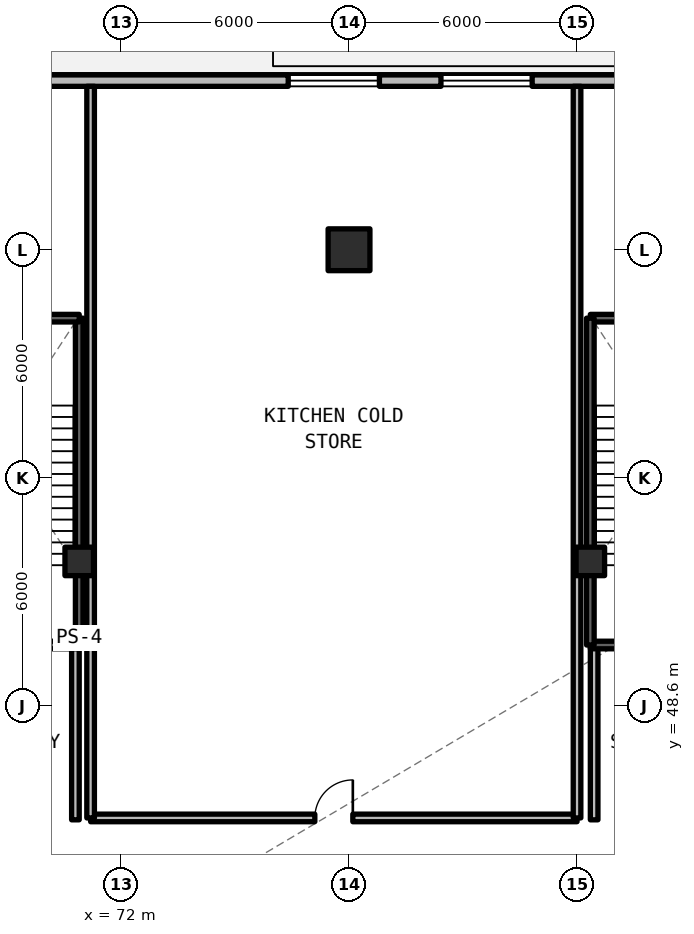
"""IFC4 building model, lengths in metres.
Left out: names, types, materials, properties, quantities, classifications, styles, units other than length and angle.
Written with IfcOpenShell. Run it as: python <this file> out.ifc"""

import sys

from ifc_helpers import new_model, si_unit, direction, frame, frame_2d, origin, origin_2d, place, context, subcontext, project, spatial, rectangle, circle, extrude, element, fill, save


model = new_model("IFC4")
c1 = context("Model", 3, precision=1e-05, world=origin(), true_north=direction((0.0, 1.0)))
c2 = subcontext(c1, "Body", "Model", "MODEL_VIEW")
j1 = project(units=[si_unit("LENGTHUNIT", "METRE"), si_unit("PLANEANGLEUNIT", "RADIAN")], contexts=[c1])
p1 = place(None, origin())
s1 = spatial("IfcSite", under=j1, at=p1, CompositionType="ELEMENT")
p2 = place(p1, origin())
s2 = spatial("IfcBuilding", under=s1, at=p2, CompositionType="ELEMENT")
p3 = place(p2, frame((0.0, 0.0, 9.9)))
s3 = spatial("IfcBuildingStorey", under=s2, at=p3, CompositionType="ELEMENT", Elevation=9.9)
p4 = place(p3, frame((78.0, 60.6, 0.0), z_axis=(0.0, 0.0, 1.0), x_axis=(1.0, 0.0, 0.0)))
e1 = element("IfcColumn", 1, at=p4, inside=s3, PredefinedType="COLUMN", context=c2, shape_type="SweptSolid", body=[
    extrude(circle(Radius=0.55, at=origin_2d()), origin(), (0.0, 0.0, 1.0), 4.95),
])
for number, where, z_axis, x_axis in (
    (2, (70.9, 52.4, 0.0), (0.0, 0.0, 1.0), (1.0, 0.0, 0.0)),
    (3, (84.35, 52.4, 0.0), (0.0, 0.0, 1.0), (1.0, 0.0, 0.0)),
):
    element("IfcColumn", number, at=place(p3, frame(where, z_axis=z_axis, x_axis=x_axis)), inside=s3, PredefinedType="COLUMN", context=c2, shape_type="SweptSolid", body=[
        extrude(rectangle(XDim=0.75, YDim=0.75, at=origin_2d()), origin(), (0.0, 0.0, 1.0), 4.95),
    ])
p5 = place(p3, frame((108.538, 65.05, 0.0), z_axis=(0.0, 0.0, 1.0), x_axis=(-1.0, 0.0, 0.0)))
e4 = element("IfcWall", 4, at=p5, inside=s3, PredefinedType="SOLIDWALL", context=c2, shape_type="SweptSolid", body=[
    extrude(rectangle(XDim=44.338, YDim=0.3, at=frame_2d((22.169, 0.0))), origin(), (0.0, 0.0, 1.0), 4.67),
])
p6 = place(p5, frame((7.75, 0.0, 0.0)))
e5 = element("IfcOpeningElement", 5, at=p6, cuts=e4, PredefinedType="OPENING", context=c2, shape_type="SweptSolid", body=[
    extrude(rectangle(XDim=1.5, YDim=2.2, at=frame_2d((0.75, 1.1))), frame((0.0, 0.16, 0.0), z_axis=(0.0, -1.0, 0.0), x_axis=(1.0, 0.0, 0.0)), (0.0, 0.0, 1.0), 0.32),
])
p7 = place(p5, frame((42.913, 0.0, 0.78)))
e6 = element("IfcOpeningElement", 6, at=p7, cuts=e4, PredefinedType="OPENING", context=c2, shape_type="SweptSolid", body=[
    extrude(rectangle(XDim=0.85, YDim=1.65, at=frame_2d((0.425, 0.825))), frame((0.0, 0.16, 0.0), z_axis=(0.0, -1.0, 0.0), x_axis=(1.0, 0.0, 0.0)), (0.0, 0.0, 1.0), 0.32),
])
p8 = place(p5, frame((29.738, 0.0, 0.78)))
e7 = element("IfcOpeningElement", 7, at=p8, cuts=e4, PredefinedType="OPENING", context=c2, shape_type="SweptSolid", body=[
    extrude(rectangle(XDim=2.4, YDim=1.66, at=frame_2d((1.2, 0.83))), frame((0.0, 0.16, 0.0), z_axis=(0.0, -1.0, 0.0), x_axis=(1.0, 0.0, 0.0)), (0.0, 0.0, 1.0), 0.32),
])
p9 = place(p5, frame((38.638, 0.0, 0.78)))
e8 = element("IfcOpeningElement", 8, at=p9, cuts=e4, PredefinedType="OPENING", context=c2, shape_type="SweptSolid", body=[
    extrude(rectangle(XDim=2.4, YDim=1.66, at=frame_2d((1.2, 0.83))), frame((0.0, 0.16, 0.0), z_axis=(0.0, -1.0, 0.0), x_axis=(1.0, 0.0, 0.0)), (0.0, 0.0, 1.0), 0.32),
])
p10 = place(p5, frame((16.219, 0.0, 0.78)))
e9 = element("IfcOpeningElement", 9, at=p10, cuts=e4, PredefinedType="OPENING", context=c2, shape_type="SweptSolid", body=[
    extrude(rectangle(XDim=2.4, YDim=1.66, at=frame_2d((1.2, 0.83))), frame((0.0, 0.16, 0.0), z_axis=(0.0, -1.0, 0.0), x_axis=(1.0, 0.0, 0.0)), (0.0, 0.0, 1.0), 0.32),
])
p11 = place(p5, frame((25.719, 0.0, 0.78)))
e10 = element("IfcOpeningElement", 10, at=p11, cuts=e4, PredefinedType="OPENING", context=c2, shape_type="SweptSolid", body=[
    extrude(rectangle(XDim=2.4, YDim=1.66, at=frame_2d((1.2, 0.83))), frame((0.0, 0.16, 0.0), z_axis=(0.0, -1.0, 0.0), x_axis=(1.0, 0.0, 0.0)), (0.0, 0.0, 1.0), 0.32),
])
for number, where, z_axis, x_axis in (
    (11, (70.8, 45.6, 0.0), (0.0, 0.0, 1.0), (0.0, 1.0, 0.0)),
    (12, (84.45, 45.6, 0.0), (0.0, 0.0, 1.0), (0.0, 1.0, 0.0)),
):
    element("IfcWall", number, at=place(p3, frame(where, z_axis=z_axis, x_axis=x_axis)), inside=s3, PredefinedType="SOLIDWALL", context=c2, shape_type="SweptSolid", body=[
        extrude(rectangle(XDim=4.6, YDim=0.2, at=frame_2d((2.3, 0.0))), origin(), (0.0, 0.0, 1.0), 3.89),
    ])
p12 = place(p3, frame((71.2, 45.65, 0.0), z_axis=(0.0, 0.0, 1.0), x_axis=(1.0, 0.0, 0.0)))
e13 = element("IfcWall", 13, at=p12, inside=s3, PredefinedType="SOLIDWALL", context=c2, shape_type="SweptSolid", body=[
    extrude(rectangle(XDim=12.8, YDim=0.2, at=frame_2d((6.4, 0.0))), origin(), (0.0, 0.0, 1.0), 3.89),
])
p13 = place(p12, frame((5.9, 0.0, 0.0)))
e14 = element("IfcOpeningElement", 14, at=p13, cuts=e13, PredefinedType="OPENING", context=c2, shape_type="SweptSolid", body=[
    extrude(rectangle(XDim=1.0, YDim=2.15, at=frame_2d((0.5, 1.075))), frame((0.0, 0.11, 0.0), z_axis=(0.0, -1.0, 0.0), x_axis=(1.0, 0.0, 0.0)), (0.0, 0.0, 1.0), 0.22),
])
for number, where, z_axis, x_axis in (
    (15, (71.2, 45.65, 0.0), (0.0, 0.0, 1.0), (0.0, 1.0, 0.0)),
    (16, (84.0, 45.65, 0.0), (0.0, 0.0, 1.0), (0.0, 1.0, 0.0)),
):
    element("IfcWall", number, at=place(p3, frame(where, z_axis=z_axis, x_axis=x_axis)), inside=s3, PredefinedType="SOLIDWALL", context=c2, shape_type="SweptSolid", body=[
        extrude(rectangle(XDim=19.25, YDim=0.2, at=frame_2d((9.625, 0.0))), origin(), (0.0, 0.0, 1.0), 3.89),
    ])
p14 = place(p3, frame((66.5, 50.2, 0.0), z_axis=(0.0, 0.0, 1.0), x_axis=(1.0, 0.0, 0.0)))
e17 = element("IfcWall", 17, at=p14, inside=s3, PredefinedType="SOLIDWALL", context=c2, shape_type="SweptSolid", body=[
    extrude(rectangle(XDim=4.4, YDim=0.2, at=frame_2d((2.2, 0.0))), origin(), (0.0, 0.0, 1.0), 4.95),
])
p15 = place(p14, frame((1.625, 0.0, 0.0)))
e18 = element("IfcOpeningElement", 18, at=p15, cuts=e17, PredefinedType="OPENING", context=c2, shape_type="SweptSolid", body=[
    extrude(rectangle(XDim=1.15, YDim=2.15, at=frame_2d((0.575, 1.075))), frame((0.0, 0.11, 0.0), z_axis=(0.0, -1.0, 0.0), x_axis=(1.0, 0.0, 0.0)), (0.0, 0.0, 1.0), 0.22),
])
p16 = place(p3, frame((70.9, 50.2, 0.0), z_axis=(0.0, 0.0, 1.0), x_axis=(0.0, 1.0, 0.0)))
e19 = element("IfcWall", 19, at=p16, inside=s3, PredefinedType="SOLIDWALL", context=c2, shape_type="SweptSolid", body=[
    extrude(rectangle(XDim=8.6, YDim=0.2, at=frame_2d((4.3, 0.0))), origin(), (0.0, 0.0, 1.0), 4.95),
])
p17 = place(p3, frame((70.9, 58.8, 0.0), z_axis=(0.0, 0.0, 1.0), x_axis=(-1.0, 0.0, 0.0)))
e20 = element("IfcWall", 20, at=p17, inside=s3, PredefinedType="SOLIDWALL", context=c2, shape_type="SweptSolid", body=[
    extrude(rectangle(XDim=4.4, YDim=0.2, at=frame_2d((2.2, 0.0))), origin(), (0.0, 0.0, 1.0), 4.95),
])
p18 = place(p3, frame((84.35, 50.2, 0.0), z_axis=(0.0, 0.0, 1.0), x_axis=(1.0, 0.0, 0.0)))
e21 = element("IfcWall", 21, at=p18, inside=s3, PredefinedType="SOLIDWALL", context=c2, shape_type="SweptSolid", body=[
    extrude(rectangle(XDim=4.4, YDim=0.2, at=frame_2d((2.2, 0.0))), origin(), (0.0, 0.0, 1.0), 4.95),
])
p19 = place(p18, frame((1.625, 0.0, 0.0)))
e22 = element("IfcOpeningElement", 22, at=p19, cuts=e21, PredefinedType="OPENING", context=c2, shape_type="SweptSolid", body=[
    extrude(rectangle(XDim=1.15, YDim=2.15, at=frame_2d((0.575, 1.075))), frame((0.0, 0.11, 0.0), z_axis=(0.0, -1.0, 0.0), x_axis=(1.0, 0.0, 0.0)), (0.0, 0.0, 1.0), 0.22),
])
p20 = place(p3, frame((88.75, 58.8, 0.0), z_axis=(0.0, 0.0, 1.0), x_axis=(-1.0, 0.0, 0.0)))
e23 = element("IfcWall", 23, at=p20, inside=s3, PredefinedType="SOLIDWALL", context=c2, shape_type="SweptSolid", body=[
    extrude(rectangle(XDim=4.4, YDim=0.2, at=frame_2d((2.2, 0.0))), origin(), (0.0, 0.0, 1.0), 4.95),
])
p21 = place(p3, frame((84.35, 58.8, 0.0), z_axis=(0.0, 0.0, 1.0), x_axis=(0.0, -1.0, 0.0)))
e24 = element("IfcWall", 24, at=p21, inside=s3, PredefinedType="SOLIDWALL", context=c2, shape_type="SweptSolid", body=[
    extrude(rectangle(XDim=8.6, YDim=0.2, at=frame_2d((4.3, 0.0))), origin(), (0.0, 0.0, 1.0), 4.95),
])
p22 = place(p8, origin())
e25 = element("IfcWindow", 25, at=p22, inside=s3, PartitioningType="SINGLE_PANEL", PredefinedType="WINDOW", context=c2, shape_type="SweptSolid", body=[
    extrude(rectangle(XDim=2.4, YDim=1.66, at=frame_2d((1.2, 0.83))), frame((0.0, 0.03, 0.0), z_axis=(0.0, -1.0, 0.0), x_axis=(1.0, 0.0, 0.0)), (0.0, 0.0, 1.0), 0.06),
])
fill(e7, e25)
p23 = place(p11, origin())
e26 = element("IfcWindow", 26, at=p23, inside=s3, PartitioningType="SINGLE_PANEL", PredefinedType="WINDOW", context=c2, shape_type="SweptSolid", body=[
    extrude(rectangle(XDim=2.4, YDim=1.66, at=frame_2d((1.2, 0.83))), frame((0.0, 0.03, 0.0), z_axis=(0.0, -1.0, 0.0), x_axis=(1.0, 0.0, 0.0)), (0.0, 0.0, 1.0), 0.06),
])
fill(e10, e26)
p24 = place(p13, origin())
e27 = element("IfcDoor", 27, at=p24, inside=s3, OperationType="SINGLE_SWING_RIGHT", PredefinedType="DOOR", context=c2, shape_type="SweptSolid", body=[
    extrude(rectangle(XDim=1.0, YDim=2.15, at=frame_2d((0.5, 1.075))), frame((0.0, 0.025, 0.0), z_axis=(0.0, -1.0, 0.0), x_axis=(1.0, 0.0, 0.0)), (0.0, 0.0, 1.0), 0.05),
])
fill(e14, e27)
save(model, sys.argv[1])
